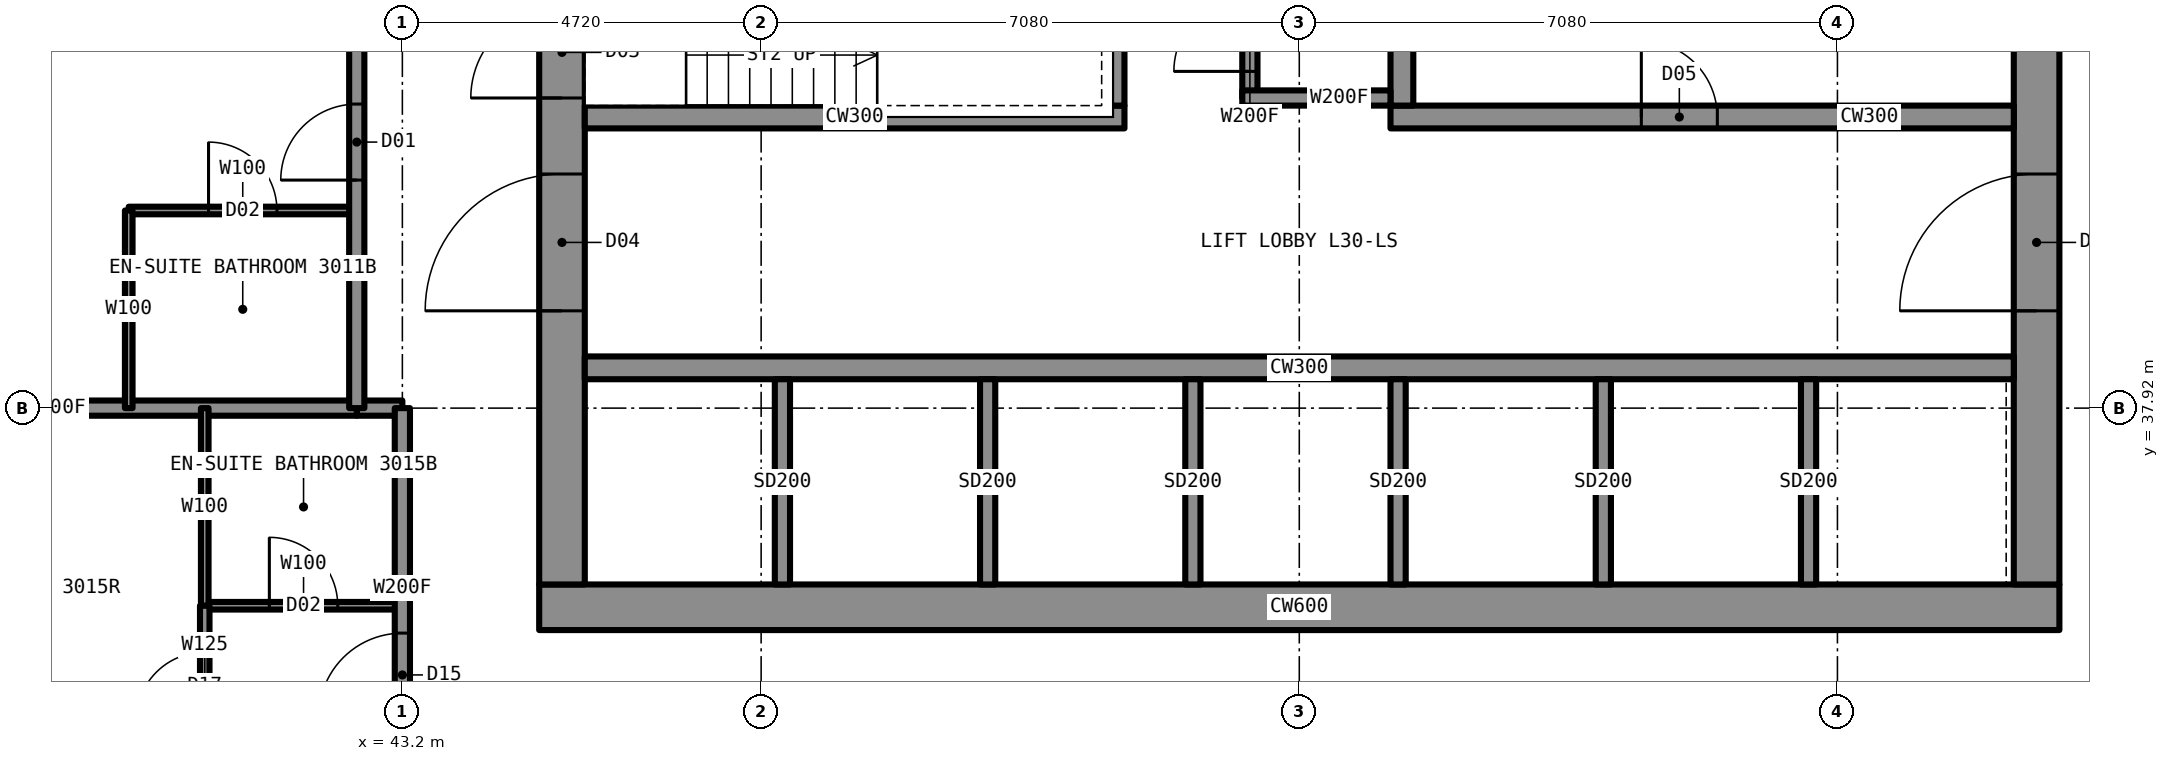
"""IFC4 building model, lengths in metres.
Left out: names, types, materials, properties, quantities, classifications, styles, units other than length and angle.
Written with IfcOpenShell. Run it as: python <this file> out.ifc"""

import sys

from ifc_helpers import new_model, si_unit, direction, frame, frame_2d, origin, place, context, subcontext, project, spatial, rectangle, extrude, element, fill, save


model = new_model("IFC4")
c1 = context("Model", 3, precision=1e-05, world=origin(), true_north=direction((0.0, 1.0)))
c2 = subcontext(c1, "Body", "Model", "MODEL_VIEW")
j1 = project(units=[si_unit("LENGTHUNIT", "METRE"), si_unit("PLANEANGLEUNIT", "RADIAN")], contexts=[c1])
p1 = place(None, origin())
s1 = spatial("IfcSite", under=j1, at=p1, CompositionType="ELEMENT")
p2 = place(p1, origin())
s2 = spatial("IfcBuilding", under=s1, at=p2, CompositionType="ELEMENT")
p3 = place(p2, frame((0.0, 0.0, 114.4)))
s3 = spatial("IfcBuildingStorey", under=s2, at=p3, CompositionType="ELEMENT", Elevation=114.4)
p4 = place(p3, frame((45.0, 35.3, 0.0), z_axis=(0.0, 0.0, 1.0), x_axis=(1.0, 0.0, 0.0)))
e1 = element("IfcWall", 1, at=p4, inside=s3, PredefinedType="SHEAR", context=c2, shape_type="SweptSolid", body=[
    extrude(rectangle(XDim=20.0, YDim=0.6, at=frame_2d((10.0, 0.0))), origin(), (0.0, 0.0, 1.0), 3.5),
])
p5 = place(p3, frame((64.7, 35.6, 0.0), z_axis=(0.0, 0.0, 1.0), x_axis=(0.0, 1.0, 0.0)))
e2 = element("IfcWall", 2, at=p5, inside=s3, PredefinedType="SHEAR", context=c2, shape_type="SweptSolid", body=[
    extrude(rectangle(XDim=18.8, YDim=0.6, at=frame_2d((9.4, 0.0))), origin(), (0.0, 0.0, 1.0), 3.5),
])
p6 = place(p5, frame((13.4, 0.0, 0.0)))
e3 = element("IfcOpeningElement", 3, at=p6, cuts=e2, PredefinedType="OPENING", context=c2, shape_type="SweptSolid", body=[
    extrude(rectangle(XDim=1.8, YDim=2.2, at=frame_2d((0.9, 1.1))), frame((0.0, 0.31, 0.0), z_axis=(0.0, -1.0, 0.0), x_axis=(1.0, 0.0, 0.0)), (0.0, 0.0, 1.0), 0.62),
])
p7 = place(p5, frame((3.6, 0.0, 0.0)))
e4 = element("IfcOpeningElement", 4, at=p7, cuts=e2, PredefinedType="OPENING", context=c2, shape_type="SweptSolid", body=[
    extrude(rectangle(XDim=1.8, YDim=2.2, at=frame_2d((0.9, 1.1))), frame((0.0, 0.31, 0.0), z_axis=(0.0, -1.0, 0.0), x_axis=(1.0, 0.0, 0.0)), (0.0, 0.0, 1.0), 0.62),
])
p8 = place(p3, frame((45.3, 35.6, 0.0), z_axis=(0.0, 0.0, 1.0), x_axis=(0.0, 1.0, 0.0)))
e5 = element("IfcWall", 5, at=p8, inside=s3, PredefinedType="SHEAR", context=c2, shape_type="SweptSolid", body=[
    extrude(rectangle(XDim=18.8, YDim=0.6, at=frame_2d((9.4, 0.0))), origin(), (0.0, 0.0, 1.0), 3.5),
])
p9 = place(p8, frame((13.4, 0.0, 0.0)))
e6 = element("IfcOpeningElement", 6, at=p9, cuts=e5, PredefinedType="OPENING", context=c2, shape_type="SweptSolid", body=[
    extrude(rectangle(XDim=1.8, YDim=2.2, at=frame_2d((0.9, 1.1))), frame((0.0, 0.31, 0.0), z_axis=(0.0, -1.0, 0.0), x_axis=(1.0, 0.0, 0.0)), (0.0, 0.0, 1.0), 0.62),
])
p10 = place(p8, frame((3.6, 0.0, 0.0)))
e7 = element("IfcOpeningElement", 7, at=p10, cuts=e5, PredefinedType="OPENING", context=c2, shape_type="SweptSolid", body=[
    extrude(rectangle(XDim=1.8, YDim=2.2, at=frame_2d((0.9, 1.1))), frame((0.0, 0.31, 0.0), z_axis=(0.0, -1.0, 0.0), x_axis=(1.0, 0.0, 0.0)), (0.0, 0.0, 1.0), 0.62),
])
p11 = place(p8, frame((6.4, 0.0, 0.0)))
e8 = element("IfcOpeningElement", 8, at=p11, cuts=e5, PredefinedType="OPENING", context=c2, shape_type="SweptSolid", body=[
    extrude(rectangle(XDim=1.2, YDim=2.2, at=frame_2d((0.6, 1.1))), frame((0.0, 0.31, 0.0), z_axis=(0.0, -1.0, 0.0), x_axis=(1.0, 0.0, 0.0)), (0.0, 0.0, 1.0), 0.62),
])
p12 = place(p3, frame((45.6, 38.45, 0.0), z_axis=(0.0, 0.0, 1.0), x_axis=(1.0, 0.0, 0.0)))
e9 = element("IfcWall", 9, at=p12, inside=s3, PredefinedType="SHEAR", context=c2, shape_type="SweptSolid", body=[
    extrude(rectangle(XDim=18.8, YDim=0.3, at=frame_2d((9.4, 0.0))), origin(), (0.0, 0.0, 1.0), 3.5),
])
p13 = place(p3, frame((45.6, 41.75, 0.0), z_axis=(0.0, 0.0, 1.0), x_axis=(1.0, 0.0, 0.0)))
e10 = element("IfcWall", 10, at=p13, inside=s3, PredefinedType="SHEAR", context=c2, shape_type="SweptSolid", body=[
    extrude(rectangle(XDim=7.1, YDim=0.3, at=frame_2d((3.55, 0.0))), origin(), (0.0, 0.0, 1.0), 3.5),
])
p14 = place(p3, frame((56.2, 41.75, 0.0), z_axis=(0.0, 0.0, 1.0), x_axis=(1.0, 0.0, 0.0)))
e11 = element("IfcWall", 11, at=p14, inside=s3, PredefinedType="SHEAR", context=c2, shape_type="SweptSolid", body=[
    extrude(rectangle(XDim=8.2, YDim=0.3, at=frame_2d((4.1, 0.0))), origin(), (0.0, 0.0, 1.0), 3.5),
])
p15 = place(p14, frame((3.3, 0.0, 0.0)))
e12 = element("IfcOpeningElement", 12, at=p15, cuts=e11, PredefinedType="OPENING", context=c2, shape_type="SweptSolid", body=[
    extrude(rectangle(XDim=1.0, YDim=2.1, at=frame_2d((0.5, 1.05))), frame((0.0, 0.16, 0.0), z_axis=(0.0, -1.0, 0.0), x_axis=(1.0, 0.0, 0.0)), (0.0, 0.0, 1.0), 0.32),
])
p16 = place(p3, frame((52.55, 41.9, 0.0), z_axis=(0.0, 0.0, 1.0), x_axis=(0.0, 1.0, 0.0)))
e13 = element("IfcWall", 13, at=p16, inside=s3, PredefinedType="SHEAR", context=c2, shape_type="SweptSolid", body=[
    extrude(rectangle(XDim=6.2, YDim=0.3, at=frame_2d((3.1, 0.0))), origin(), (0.0, 0.0, 1.0), 3.5),
])
p17 = place(p16, frame((4.125, 0.0, 0.0)))
e14 = element("IfcOpeningElement", 14, at=p17, cuts=e13, PredefinedType="OPENING", context=c2, shape_type="SweptSolid", body=[
    extrude(rectangle(XDim=1.2, YDim=2.2, at=frame_2d((0.6, 1.1))), frame((0.0, 0.16, 0.0), z_axis=(0.0, -1.0, 0.0), x_axis=(1.0, 0.0, 0.0)), (0.0, 0.0, 1.0), 0.32),
])
p18 = place(p3, frame((56.35, 41.9, 0.0), z_axis=(0.0, 0.0, 1.0), x_axis=(0.0, 1.0, 0.0)))
e15 = element("IfcWall", 15, at=p18, inside=s3, PredefinedType="SHEAR", context=c2, shape_type="SweptSolid", body=[
    extrude(rectangle(XDim=9.5, YDim=0.3, at=frame_2d((4.75, 0.0))), origin(), (0.0, 0.0, 1.0), 3.5),
])
p19 = place(p18, frame((7.1, 0.0, 0.0)))
e16 = element("IfcOpeningElement", 16, at=p19, cuts=e15, PredefinedType="OPENING", context=c2, shape_type="SweptSolid", body=[
    extrude(rectangle(XDim=1.8, YDim=2.2, at=frame_2d((0.9, 1.1))), frame((0.0, 0.16, 0.0), z_axis=(0.0, -1.0, 0.0), x_axis=(1.0, 0.0, 0.0)), (0.0, 0.0, 1.0), 0.32),
])
p20 = place(p3, frame((39.6, 40.52, 0.0), z_axis=(0.0, 0.0, 1.0), x_axis=(1.0, 0.0, 0.0)))
e17 = element("IfcWall", 17, at=p20, inside=s3, PredefinedType="PARTITIONING", context=c2, shape_type="SweptSolid", body=[
    extrude(rectangle(XDim=3.0, YDim=0.1, at=frame_2d((1.5, 0.0))), origin(), (0.0, 0.0, 1.0), 3.33),
])
p21 = place(p20, frame((1.05, 0.0, 0.0)))
e18 = element("IfcOpeningElement", 18, at=p21, cuts=e17, PredefinedType="OPENING", context=c2, shape_type="SweptSolid", body=[
    extrude(rectangle(XDim=0.9, YDim=2.1, at=frame_2d((0.45, 1.05))), frame((0.0, 0.06, 0.0), z_axis=(0.0, -1.0, 0.0), x_axis=(1.0, 0.0, 0.0)), (0.0, 0.0, 1.0), 0.12),
])
p22 = place(p3, frame((42.6, 37.92, 0.0), z_axis=(0.0, 0.0, 1.0), x_axis=(1.0, 0.0, 0.0)))
e19 = element("IfcWall", 19, at=p22, inside=s3, PredefinedType="PARTITIONING", context=c2, shape_type="SweptSolid", body=[
    extrude(rectangle(XDim=0.6, YDim=0.2, at=frame_2d((0.3, 0.0))), origin(), (0.0, 0.0, 1.0), 2.573),
])
p23 = place(p3, frame((34.7, 37.92, 0.0), z_axis=(0.0, 0.0, 1.0), x_axis=(1.0, 0.0, 0.0)))
e20 = element("IfcWall", 20, at=p23, inside=s3, PredefinedType="PARTITIONING", context=c2, shape_type="SweptSolid", body=[
    extrude(rectangle(XDim=7.9, YDim=0.2, at=frame_2d((3.95, 0.0))), origin(), (0.0, 0.0, 1.0), 2.573),
])
p24 = place(p3, frame((40.6, 35.32, 0.0), z_axis=(0.0, 0.0, 1.0), x_axis=(1.0, 0.0, 0.0)))
e21 = element("IfcWall", 21, at=p24, inside=s3, PredefinedType="PARTITIONING", context=c2, shape_type="SweptSolid", body=[
    extrude(rectangle(XDim=2.6, YDim=0.1, at=frame_2d((1.3, 0.0))), origin(), (0.0, 0.0, 1.0), 3.33),
])
p25 = place(p24, frame((0.85, 0.0, 0.0)))
e22 = element("IfcOpeningElement", 22, at=p25, cuts=e21, PredefinedType="OPENING", context=c2, shape_type="SweptSolid", body=[
    extrude(rectangle(XDim=0.9, YDim=2.1, at=frame_2d((0.45, 1.05))), frame((0.0, 0.06, 0.0), z_axis=(0.0, -1.0, 0.0), x_axis=(1.0, 0.0, 0.0)), (0.0, 0.0, 1.0), 0.12),
])
p26 = place(p3, frame((43.2, 33.2, 0.0), z_axis=(0.0, 0.0, 1.0), x_axis=(0.0, 1.0, 0.0)))
e23 = element("IfcWall", 23, at=p26, inside=s3, PredefinedType="PARTITIONING", context=c2, shape_type="SweptSolid", body=[
    extrude(rectangle(XDim=4.72, YDim=0.2, at=frame_2d((2.36, 0.0))), origin(), (0.0, 0.0, 1.0), 3.33),
])
p27 = place(p26, frame((0.66, 0.0, 0.0)))
e24 = element("IfcOpeningElement", 24, at=p27, cuts=e23, PredefinedType="OPENING", context=c2, shape_type="SweptSolid", body=[
    extrude(rectangle(XDim=1.1, YDim=2.2, at=frame_2d((0.55, 1.1))), frame((0.0, 0.11, 0.0), z_axis=(0.0, -1.0, 0.0), x_axis=(1.0, 0.0, 0.0)), (0.0, 0.0, 1.0), 0.22),
])
p28 = place(p3, frame((42.6, 37.92, 0.0), z_axis=(0.0, 0.0, 1.0), x_axis=(0.0, 1.0, 0.0)))
e25 = element("IfcWall", 25, at=p28, inside=s3, PredefinedType="PARTITIONING", context=c2, shape_type="SweptSolid", body=[
    extrude(rectangle(XDim=14.16, YDim=0.2, at=frame_2d((7.08, 0.0))), origin(), (0.0, 0.0, 1.0), 3.33),
])
p29 = place(p28, frame((3.0, 0.0, 0.0)))
e26 = element("IfcOpeningElement", 26, at=p29, cuts=e25, PredefinedType="OPENING", context=c2, shape_type="SweptSolid", body=[
    extrude(rectangle(XDim=1.0, YDim=2.2, at=frame_2d((0.5, 1.1))), frame((0.0, 0.11, 0.0), z_axis=(0.0, -1.0, 0.0), x_axis=(1.0, 0.0, 0.0)), (0.0, 0.0, 1.0), 0.22),
])
p30 = place(p28, frame((12.59, 0.0, 0.0)))
e27 = element("IfcOpeningElement", 27, at=p30, cuts=e25, PredefinedType="OPENING", context=c2, shape_type="SweptSolid", body=[
    extrude(rectangle(XDim=1.0, YDim=2.2, at=frame_2d((0.5, 1.1))), frame((0.0, 0.11, 0.0), z_axis=(0.0, -1.0, 0.0), x_axis=(1.0, 0.0, 0.0)), (0.0, 0.0, 1.0), 0.22),
])
p31 = place(p3, frame((40.6, 35.32, 0.0), z_axis=(0.0, 0.0, 1.0), x_axis=(0.0, 1.0, 0.0)))
e28 = element("IfcWall", 28, at=p31, inside=s3, PredefinedType="PARTITIONING", context=c2, shape_type="SweptSolid", body=[
    extrude(rectangle(XDim=2.6, YDim=0.1, at=frame_2d((1.3, 0.0))), origin(), (0.0, 0.0, 1.0), 3.33),
])
p32 = place(p3, frame((40.6, 33.2, 0.0), z_axis=(0.0, 0.0, 1.0), x_axis=(0.0, 1.0, 0.0)))
e29 = element("IfcWall", 29, at=p32, inside=s3, PredefinedType="PARTITIONING", context=c2, shape_type="SweptSolid", body=[
    extrude(rectangle(XDim=2.12, YDim=0.125, at=frame_2d((1.06, 0.0))), origin(), (0.0, 0.0, 1.0), 3.33),
])
p33 = place(p32, frame((0.61, 0.0, 0.0)))
e30 = element("IfcOpeningElement", 30, at=p33, cuts=e29, PredefinedType="OPENING", context=c2, shape_type="SweptSolid", body=[
    extrude(rectangle(XDim=0.9, YDim=2.2, at=frame_2d((0.45, 1.1))), frame((0.0, 0.073, 0.0), z_axis=(0.0, -1.0, 0.0), x_axis=(1.0, 0.0, 0.0)), (0.0, 0.0, 1.0), 0.145),
])
p34 = place(p3, frame((39.6, 37.92, 0.0), z_axis=(0.0, 0.0, 1.0), x_axis=(0.0, 1.0, 0.0)))
e31 = element("IfcWall", 31, at=p34, inside=s3, PredefinedType="PARTITIONING", context=c2, shape_type="SweptSolid", body=[
    extrude(rectangle(XDim=2.6, YDim=0.1, at=frame_2d((1.3, 0.0))), origin(), (0.0, 0.0, 1.0), 3.33),
])
p35 = place(p3, frame((54.35, 42.0, 0.0), z_axis=(0.0, 0.0, 1.0), x_axis=(0.0, 1.0, 0.0)))
e32 = element("IfcWall", 32, at=p35, inside=s3, PredefinedType="PARTITIONING", context=c2, shape_type="SweptSolid", body=[
    extrude(rectangle(XDim=1.7, YDim=0.2, at=frame_2d((0.85, 0.0))), origin(), (0.0, 0.0, 1.0), 3.33),
])
p36 = place(p35, frame((0.35, 0.0, 0.0)))
e33 = element("IfcOpeningElement", 33, at=p36, cuts=e32, PredefinedType="OPENING", context=c2, shape_type="SweptSolid", body=[
    extrude(rectangle(XDim=1.0, YDim=2.1, at=frame_2d((0.5, 1.05))), frame((0.0, 0.11, 0.0), z_axis=(0.0, -1.0, 0.0), x_axis=(1.0, 0.0, 0.0)), (0.0, 0.0, 1.0), 0.22),
])
p37 = place(p3, frame((54.25, 42.0, 0.0), z_axis=(0.0, 0.0, 1.0), x_axis=(1.0, 0.0, 0.0)))
e34 = element("IfcWall", 34, at=p37, inside=s3, PredefinedType="PARTITIONING", context=c2, shape_type="SweptSolid", body=[
    extrude(rectangle(XDim=1.95, YDim=0.2, at=frame_2d((0.975, 0.0))), origin(), (0.0, 0.0, 1.0), 3.33),
])
for number, where, z_axis, x_axis in (
    (35, (48.2, 35.6, 0.0), (0.0, 0.0, 1.0), (0.0, 1.0, 0.0)),
    (36, (50.9, 35.6, 0.0), (0.0, 0.0, 1.0), (0.0, 1.0, 0.0)),
    (37, (53.6, 35.6, 0.0), (0.0, 0.0, 1.0), (0.0, 1.0, 0.0)),
    (38, (56.3, 35.6, 0.0), (0.0, 0.0, 1.0), (0.0, 1.0, 0.0)),
    (39, (59.0, 35.6, 0.0), (0.0, 0.0, 1.0), (0.0, 1.0, 0.0)),
    (40, (61.7, 35.6, 0.0), (0.0, 0.0, 1.0), (0.0, 1.0, 0.0)),
):
    element("IfcWall", number, at=place(p3, frame(where, z_axis=z_axis, x_axis=x_axis)), inside=s3, PredefinedType="PARTITIONING", context=c2, shape_type="SweptSolid", body=[
        extrude(rectangle(XDim=2.7, YDim=0.2, at=frame_2d((1.35, 0.0))), origin(), (0.0, 0.0, 1.0), 3.33),
    ])
p38 = place(p29, origin())
e41 = element("IfcDoor", 41, at=p38, inside=s3, OperationType="SINGLE_SWING_LEFT", PredefinedType="DOOR", context=c2, shape_type="SweptSolid", body=[
    extrude(rectangle(XDim=1.0, YDim=2.2, at=frame_2d((0.5, 1.1))), frame((0.0, 0.025, 0.0), z_axis=(0.0, -1.0, 0.0), x_axis=(1.0, 0.0, 0.0)), (0.0, 0.0, 1.0), 0.05),
])
fill(e26, e41)
p39 = place(p21, origin())
e42 = element("IfcDoor", 42, at=p39, inside=s3, OperationType="SINGLE_SWING_RIGHT", PredefinedType="DOOR", context=c2, shape_type="SweptSolid", body=[
    extrude(rectangle(XDim=0.9, YDim=2.1, at=frame_2d((0.45, 1.05))), frame((0.0, 0.025, 0.0), z_axis=(0.0, -1.0, 0.0), x_axis=(1.0, 0.0, 0.0)), (0.0, 0.0, 1.0), 0.05),
])
fill(e18, e42)
p40 = place(p25, origin())
e43 = element("IfcDoor", 43, at=p40, inside=s3, OperationType="SINGLE_SWING_RIGHT", PredefinedType="DOOR", context=c2, shape_type="SweptSolid", body=[
    extrude(rectangle(XDim=0.9, YDim=2.1, at=frame_2d((0.45, 1.05))), frame((0.0, 0.025, 0.0), z_axis=(0.0, -1.0, 0.0), x_axis=(1.0, 0.0, 0.0)), (0.0, 0.0, 1.0), 0.05),
])
fill(e22, e43)
p41 = place(p27, origin())
e44 = element("IfcDoor", 44, at=p41, inside=s3, OperationType="SINGLE_SWING_LEFT", PredefinedType="DOOR", context=c2, shape_type="SweptSolid", body=[
    extrude(rectangle(XDim=1.1, YDim=2.2, at=frame_2d((0.55, 1.1))), frame((0.0, 0.025, 0.0), z_axis=(0.0, -1.0, 0.0), x_axis=(1.0, 0.0, 0.0)), (0.0, 0.0, 1.0), 0.05),
])
fill(e24, e44)
p42 = place(p33, origin())
e45 = element("IfcDoor", 45, at=p42, inside=s3, OperationType="SINGLE_SWING_LEFT", PredefinedType="DOOR", context=c2, shape_type="SweptSolid", body=[
    extrude(rectangle(XDim=0.9, YDim=2.2, at=frame_2d((0.45, 1.1))), frame((0.0, 0.025, 0.0), z_axis=(0.0, -1.0, 0.0), x_axis=(1.0, 0.0, 0.0)), (0.0, 0.0, 1.0), 0.05),
])
fill(e30, e45)
p43 = place(p36, origin())
e46 = element("IfcDoor", 46, at=p43, inside=s3, OperationType="SINGLE_SWING_LEFT", PredefinedType="DOOR", context=c2, shape_type="SweptSolid", body=[
    extrude(rectangle(XDim=1.0, YDim=2.1, at=frame_2d((0.5, 1.05))), frame((0.0, 0.025, 0.0), z_axis=(0.0, -1.0, 0.0), x_axis=(1.0, 0.0, 0.0)), (0.0, 0.0, 1.0), 0.05),
])
fill(e33, e46)
p44 = place(p10, origin())
e47 = element("IfcDoor", 47, at=p44, inside=s3, OperationType="DOUBLE_DOOR_SINGLE_SWING", PredefinedType="DOOR", context=c2, shape_type="SweptSolid", body=[
    extrude(rectangle(XDim=1.8, YDim=2.2, at=frame_2d((0.9, 1.1))), frame((0.0, 0.025, 0.0), z_axis=(0.0, -1.0, 0.0), x_axis=(1.0, 0.0, 0.0)), (0.0, 0.0, 1.0), 0.05),
])
fill(e7, e47)
p45 = place(p7, origin())
e48 = element("IfcDoor", 48, at=p45, inside=s3, OperationType="DOUBLE_DOOR_SINGLE_SWING", PredefinedType="DOOR", context=c2, shape_type="SweptSolid", body=[
    extrude(rectangle(XDim=1.8, YDim=2.2, at=frame_2d((0.9, 1.1))), frame((0.0, 0.025, 0.0), z_axis=(0.0, -1.0, 0.0), x_axis=(1.0, 0.0, 0.0)), (0.0, 0.0, 1.0), 0.05),
])
fill(e4, e48)
p46 = place(p11, origin())
e49 = element("IfcDoor", 49, at=p46, inside=s3, OperationType="SINGLE_SWING_LEFT", PredefinedType="DOOR", context=c2, shape_type="SweptSolid", body=[
    extrude(rectangle(XDim=1.2, YDim=2.2, at=frame_2d((0.6, 1.1))), frame((0.0, 0.025, 0.0), z_axis=(0.0, -1.0, 0.0), x_axis=(1.0, 0.0, 0.0)), (0.0, 0.0, 1.0), 0.05),
])
fill(e8, e49)
p47 = place(p15, origin())
e50 = element("IfcDoor", 50, at=p47, inside=s3, OperationType="SINGLE_SWING_LEFT", PredefinedType="DOOR", context=c2, shape_type="SweptSolid", body=[
    extrude(rectangle(XDim=1.0, YDim=2.1, at=frame_2d((0.5, 1.05))), frame((0.0, 0.025, 0.0), z_axis=(0.0, -1.0, 0.0), x_axis=(1.0, 0.0, 0.0)), (0.0, 0.0, 1.0), 0.05),
])
fill(e12, e50)
save(model, sys.argv[1])
